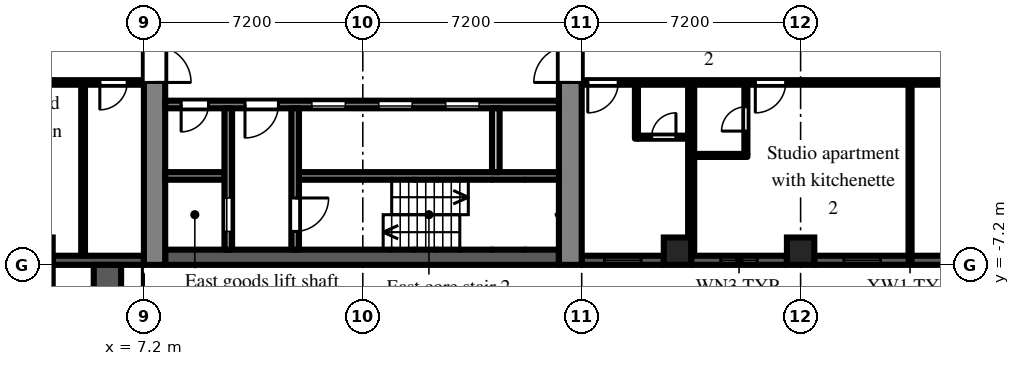
"""IFC4 building model, lengths in metres.
Left out: names, types, materials, properties, quantities, classifications, styles, units other than length and angle.
Written with IfcOpenShell. Run it as: python <this file> out.ifc"""

import sys

from ifc_helpers import new_model, si_unit, direction, frame, frame_2d, origin, origin_2d, place, context, subcontext, project, spatial, rectangle, extrude, element, fill, save


model = new_model("IFC4")
c1 = context("Model", 3, precision=1e-05, world=origin(), true_north=direction((0.0, 1.0)))
c2 = subcontext(c1, "Body", "Model", "MODEL_VIEW")
j1 = project(units=[si_unit("LENGTHUNIT", "METRE"), si_unit("PLANEANGLEUNIT", "RADIAN")], contexts=[c1])
p1 = place(None, origin())
s1 = spatial("IfcSite", under=j1, at=p1, CompositionType="ELEMENT")
p2 = place(p1, origin())
s2 = spatial("IfcBuilding", under=s1, at=p2, CompositionType="ELEMENT")
p3 = place(p2, frame((0.0, 0.0, 66.9)))
s3 = spatial("IfcBuildingStorey", under=s2, at=p3, CompositionType="ELEMENT", Elevation=66.9)
for number, where, z_axis, x_axis in (
    (1, (24.75, -6.75, 0.0), (0.0, 0.0, 1.0), (1.0, 0.0, 0.0)),
    (2, (28.8, -6.75, 0.0), (0.0, 0.0, 1.0), (1.0, 0.0, 0.0)),
):
    element("IfcColumn", number, at=place(p3, frame(where, z_axis=z_axis, x_axis=x_axis)), inside=s3, PredefinedType="COLUMN", context=c2, shape_type="SweptSolid", body=[
        extrude(rectangle(XDim=0.9, YDim=0.9, at=origin_2d()), origin(), (0.0, 0.0, 1.0), 3.0),
    ])
p4 = place(p3, frame((21.6, -7.05, 0.0), z_axis=(0.0, 0.0, 1.0), x_axis=(1.0, 0.0, 0.0)))
e3 = element("IfcWall", 3, at=p4, inside=s3, PredefinedType="SOLIDWALL", context=c2, shape_type="SweptSolid", body=[
    extrude(rectangle(XDim=2.7, YDim=0.3, at=frame_2d((1.35, 0.0))), origin(), (0.0, 0.0, 1.0), 2.1),
])
p5 = place(p4, frame((0.75, 0.0, 0.2)))
e4 = element("IfcOpeningElement", 4, at=p5, cuts=e3, PredefinedType="OPENING", context=c2, shape_type="SweptSolid", body=[
    extrude(rectangle(XDim=1.2, YDim=1.85, at=frame_2d((0.6, 0.925))), frame((0.0, 0.16, 0.0), z_axis=(0.0, -1.0, 0.0), x_axis=(1.0, 0.0, 0.0)), (0.0, 0.0, 1.0), 0.32),
])
p6 = place(p3, frame((25.2, -7.05, 0.0), z_axis=(0.0, 0.0, 1.0), x_axis=(1.0, 0.0, 0.0)))
e5 = element("IfcWall", 5, at=p6, inside=s3, PredefinedType="SOLIDWALL", context=c2, shape_type="SweptSolid", body=[
    extrude(rectangle(XDim=3.15, YDim=0.3, at=frame_2d((1.575, 0.0))), origin(), (0.0, 0.0, 1.0), 2.1),
])
p7 = place(p6, frame((0.975, 0.0, 0.2)))
e6 = element("IfcOpeningElement", 6, at=p7, cuts=e5, PredefinedType="OPENING", context=c2, shape_type="SweptSolid", body=[
    extrude(rectangle(XDim=1.2, YDim=1.85, at=frame_2d((0.6, 0.925))), frame((0.0, 0.16, 0.0), z_axis=(0.0, -1.0, 0.0), x_axis=(1.0, 0.0, 0.0)), (0.0, 0.0, 1.0), 0.32),
])
p8 = place(p3, frame((29.25, -7.05, 0.0), z_axis=(0.0, 0.0, 1.0), x_axis=(1.0, 0.0, 0.0)))
e7 = element("IfcWall", 7, at=p8, inside=s3, PredefinedType="SOLIDWALL", context=c2, shape_type="SweptSolid", body=[
    extrude(rectangle(XDim=6.3, YDim=0.3, at=frame_2d((3.15, 0.0))), origin(), (0.0, 0.0, 1.0), 2.1),
])
p9 = place(p8, frame((0.975, 0.0, 0.2)))
e8 = element("IfcOpeningElement", 8, at=p9, cuts=e7, PredefinedType="OPENING", context=c2, shape_type="SweptSolid", body=[
    extrude(rectangle(XDim=1.2, YDim=1.85, at=frame_2d((0.6, 0.925))), frame((0.0, 0.16, 0.0), z_axis=(0.0, -1.0, 0.0), x_axis=(1.0, 0.0, 0.0)), (0.0, 0.0, 1.0), 0.32),
])
p10 = place(p3, frame((4.05, -14.4, 0.0), z_axis=(0.0, 0.0, 1.0), x_axis=(0.0, 1.0, 0.0)))
e9 = element("IfcWall", 9, at=p10, inside=s3, PredefinedType="SOLIDWALL", context=c2, shape_type="SweptSolid", body=[
    extrude(rectangle(XDim=7.2, YDim=0.3, at=frame_2d((3.6, 0.0))), origin(), (0.0, 0.0, 1.0), 2.1),
])
p11 = place(p10, frame((3.0, 0.0, 0.0)))
e10 = element("IfcOpeningElement", 10, at=p11, cuts=e9, PredefinedType="OPENING", context=c2, shape_type="SweptSolid", body=[
    extrude(rectangle(XDim=1.2, YDim=2.05, at=frame_2d((0.6, 1.025))), frame((0.0, 0.16, 0.0), z_axis=(0.0, -1.0, 0.0), x_axis=(1.0, 0.0, 0.0)), (0.0, 0.0, 1.0), 0.32),
])
p12 = place(p10, frame((0.9, 0.0, 0.2)))
e11 = element("IfcOpeningElement", 11, at=p12, cuts=e9, PredefinedType="OPENING", context=c2, shape_type="SweptSolid", body=[
    extrude(rectangle(XDim=1.8, YDim=1.85, at=frame_2d((0.9, 0.925))), frame((0.0, 0.16, 0.0), z_axis=(0.0, -1.0, 0.0), x_axis=(1.0, 0.0, 0.0)), (0.0, 0.0, 1.0), 0.32),
])
p13 = place(p10, frame((4.5, 0.0, 0.2)))
e12 = element("IfcOpeningElement", 12, at=p13, cuts=e9, PredefinedType="OPENING", context=c2, shape_type="SweptSolid", body=[
    extrude(rectangle(XDim=1.8, YDim=1.85, at=frame_2d((0.9, 0.925))), frame((0.0, 0.16, 0.0), z_axis=(0.0, -1.0, 0.0), x_axis=(1.0, 0.0, 0.0)), (0.0, 0.0, 1.0), 0.32),
])
p14 = place(p3, frame((4.2, -7.05, 0.0), z_axis=(0.0, 0.0, 1.0), x_axis=(1.0, 0.0, 0.0)))
e13 = element("IfcWall", 13, at=p14, inside=s3, PredefinedType="SOLIDWALL", context=c2, shape_type="SweptSolid", body=[
    extrude(rectangle(XDim=3.0, YDim=0.3, at=frame_2d((1.5, 0.0))), origin(), (0.0, 0.0, 1.0), 2.1),
])
p15 = place(p3, frame((6.0, -14.4, 0.0), z_axis=(0.0, 0.0, 1.0), x_axis=(0.0, 1.0, 0.0)))
e14 = element("IfcWall", 14, at=p15, inside=s3, PredefinedType="PARAPET", context=c2, shape_type="SweptSolid", body=[
    extrude(rectangle(XDim=7.2, YDim=0.9, at=frame_2d((3.6, 0.0))), origin(), (0.0, 0.0, 1.0), 0.8),
])
p16 = place(p3, frame((7.55, -7.2, 0.0), z_axis=(0.0, 0.0, 1.0), x_axis=(0.0, 1.0, 0.0)))
e15 = element("IfcWall", 15, at=p16, inside=s3, PredefinedType="SHEAR", context=c2, shape_type="SweptSolid", body=[
    extrude(rectangle(XDim=14.4, YDim=0.7, at=frame_2d((7.2, 0.0))), origin(), (0.0, 0.0, 1.0), 2.575),
])
p17 = place(p16, frame((6.0, 0.0, 0.0)))
e16 = element("IfcOpeningElement", 16, at=p17, cuts=e15, PredefinedType="OPENING", context=c2, shape_type="SweptSolid", body=[
    extrude(rectangle(XDim=2.4, YDim=2.2, at=frame_2d((1.2, 1.1))), frame((0.0, 0.36, 0.0), z_axis=(0.0, -1.0, 0.0), x_axis=(1.0, 0.0, 0.0)), (0.0, 0.0, 1.0), 0.72),
])
p18 = place(p3, frame((21.225, -7.2, 0.0), z_axis=(0.0, 0.0, 1.0), x_axis=(0.0, 1.0, 0.0)))
e17 = element("IfcWall", 17, at=p18, inside=s3, PredefinedType="SHEAR", context=c2, shape_type="SweptSolid", body=[
    extrude(rectangle(XDim=14.4, YDim=0.75, at=frame_2d((7.2, 0.0))), origin(), (0.0, 0.0, 1.0), 2.575),
])
p19 = place(p18, frame((6.0, 0.0, 0.0)))
e18 = element("IfcOpeningElement", 18, at=p19, cuts=e17, PredefinedType="OPENING", context=c2, shape_type="SweptSolid", body=[
    extrude(rectangle(XDim=2.4, YDim=2.2, at=frame_2d((1.2, 1.1))), frame((0.0, 0.385, 0.0), z_axis=(0.0, -1.0, 0.0), x_axis=(1.0, 0.0, 0.0)), (0.0, 0.0, 1.0), 0.77),
])
p20 = place(p3, frame((7.9, -6.95, 0.0), z_axis=(0.0, 0.0, 1.0), x_axis=(1.0, 0.0, 0.0)))
e19 = element("IfcWall", 19, at=p20, inside=s3, PredefinedType="SHEAR", context=c2, shape_type="SweptSolid", body=[
    extrude(rectangle(XDim=12.95, YDim=0.5, at=frame_2d((6.475, 0.0))), origin(), (0.0, 0.0, 1.0), 2.575),
])
p21 = place(p3, frame((7.9, -1.925, 0.0), z_axis=(0.0, 0.0, 1.0), x_axis=(1.0, 0.0, 0.0)))
e20 = element("IfcWall", 20, at=p21, inside=s3, PredefinedType="SHEAR", context=c2, shape_type="SweptSolid", body=[
    extrude(rectangle(XDim=12.95, YDim=0.25, at=frame_2d((6.475, 0.0))), origin(), (0.0, 0.0, 1.0), 2.575),
])
p22 = place(p21, frame((4.825, 0.0, 0.0)))
e21 = element("IfcOpeningElement", 21, at=p22, cuts=e20, PredefinedType="OPENING", context=c2, shape_type="SweptSolid", body=[
    extrude(rectangle(XDim=1.1, YDim=2.1, at=frame_2d((0.55, 1.05))), frame((0.0, 0.135, 0.0), z_axis=(0.0, -1.0, 0.0), x_axis=(1.0, 0.0, 0.0)), (0.0, 0.0, 1.0), 0.27),
])
p23 = place(p21, frame((7.025, 0.0, 0.0)))
e22 = element("IfcOpeningElement", 22, at=p23, cuts=e20, PredefinedType="OPENING", context=c2, shape_type="SweptSolid", body=[
    extrude(rectangle(XDim=1.1, YDim=2.1, at=frame_2d((0.55, 1.05))), frame((0.0, 0.135, 0.0), z_axis=(0.0, -1.0, 0.0), x_axis=(1.0, 0.0, 0.0)), (0.0, 0.0, 1.0), 0.27),
])
p24 = place(p21, frame((9.225, 0.0, 0.0)))
e23 = element("IfcOpeningElement", 23, at=p24, cuts=e20, PredefinedType="OPENING", context=c2, shape_type="SweptSolid", body=[
    extrude(rectangle(XDim=1.1, YDim=2.1, at=frame_2d((0.55, 1.05))), frame((0.0, 0.135, 0.0), z_axis=(0.0, -1.0, 0.0), x_axis=(1.0, 0.0, 0.0)), (0.0, 0.0, 1.0), 0.27),
])
p25 = place(p21, frame((0.525, 0.0, 0.0)))
e24 = element("IfcOpeningElement", 24, at=p25, cuts=e20, PredefinedType="OPENING", context=c2, shape_type="SweptSolid", body=[
    extrude(rectangle(XDim=0.9, YDim=2.1, at=frame_2d((0.45, 1.05))), frame((0.0, 0.135, 0.0), z_axis=(0.0, -1.0, 0.0), x_axis=(1.0, 0.0, 0.0)), (0.0, 0.0, 1.0), 0.27),
])
p26 = place(p21, frame((2.625, 0.0, 0.0)))
e25 = element("IfcOpeningElement", 25, at=p26, cuts=e20, PredefinedType="OPENING", context=c2, shape_type="SweptSolid", body=[
    extrude(rectangle(XDim=1.1, YDim=2.1, at=frame_2d((0.55, 1.05))), frame((0.0, 0.135, 0.0), z_axis=(0.0, -1.0, 0.0), x_axis=(1.0, 0.0, 0.0)), (0.0, 0.0, 1.0), 0.27),
])
p27 = place(p3, frame((7.9, -4.275, 0.0), z_axis=(0.0, 0.0, 1.0), x_axis=(1.0, 0.0, 0.0)))
e26 = element("IfcWall", 26, at=p27, inside=s3, PredefinedType="SHEAR", context=c2, shape_type="SweptSolid", body=[
    extrude(rectangle(XDim=1.95, YDim=0.25, at=frame_2d((0.975, 0.0))), origin(), (0.0, 0.0, 1.0), 2.575),
])
p28 = place(p3, frame((12.3, -4.275, 0.0), z_axis=(0.0, 0.0, 1.0), x_axis=(1.0, 0.0, 0.0)))
e27 = element("IfcWall", 27, at=p28, inside=s3, PredefinedType="SHEAR", context=c2, shape_type="SweptSolid", body=[
    extrude(rectangle(XDim=8.55, YDim=0.25, at=frame_2d((4.275, 0.0))), origin(), (0.0, 0.0, 1.0), 2.575),
])
p29 = place(p3, frame((9.975, -2.05, 0.0), z_axis=(0.0, 0.0, 1.0), x_axis=(0.0, -1.0, 0.0)))
e28 = element("IfcWall", 28, at=p29, inside=s3, PredefinedType="SHEAR", context=c2, shape_type="SweptSolid", body=[
    extrude(rectangle(XDim=4.65, YDim=0.25, at=frame_2d((2.325, 0.0))), origin(), (0.0, 0.0, 1.0), 2.575),
])
p30 = place(p29, frame((2.95, 0.0, 0.0)))
e29 = element("IfcOpeningElement", 29, at=p30, cuts=e28, PredefinedType="OPENING", context=c2, shape_type="SweptSolid", body=[
    extrude(rectangle(XDim=1.1, YDim=2.1, at=frame_2d((0.55, 1.05))), frame((0.0, 0.135, 0.0), z_axis=(0.0, -1.0, 0.0), x_axis=(1.0, 0.0, 0.0)), (0.0, 0.0, 1.0), 0.27),
])
p31 = place(p3, frame((12.175, -2.05, 0.0), z_axis=(0.0, 0.0, 1.0), x_axis=(0.0, -1.0, 0.0)))
e30 = element("IfcWall", 30, at=p31, inside=s3, PredefinedType="SHEAR", context=c2, shape_type="SweptSolid", body=[
    extrude(rectangle(XDim=4.65, YDim=0.25, at=frame_2d((2.325, 0.0))), origin(), (0.0, 0.0, 1.0), 2.575),
])
p32 = place(p31, frame((2.95, 0.0, 0.0)))
e31 = element("IfcOpeningElement", 31, at=p32, cuts=e30, PredefinedType="OPENING", context=c2, shape_type="SweptSolid", body=[
    extrude(rectangle(XDim=1.1, YDim=2.1, at=frame_2d((0.55, 1.05))), frame((0.0, 0.135, 0.0), z_axis=(0.0, -1.0, 0.0), x_axis=(1.0, 0.0, 0.0)), (0.0, 0.0, 1.0), 0.27),
])
p33 = place(p3, frame((18.775, -2.05, 0.0), z_axis=(0.0, 0.0, 1.0), x_axis=(0.0, -1.0, 0.0)))
e32 = element("IfcWall", 32, at=p33, inside=s3, PredefinedType="PARTITIONING", context=c2, shape_type="SweptSolid", body=[
    extrude(rectangle(XDim=2.1, YDim=0.25, at=frame_2d((1.05, 0.0))), origin(), (0.0, 0.0, 1.0), 2.575),
])
p34 = place(p3, frame((1.275, -1.2, 0.0), z_axis=(0.0, 0.0, 1.0), x_axis=(1.0, 0.0, 0.0)))
e33 = element("IfcWall", 33, at=p34, inside=s3, PredefinedType="PARTITIONING", context=c2, shape_type="SweptSolid", body=[
    extrude(rectangle(XDim=5.925, YDim=0.15, at=frame_2d((2.962, 0.0))), origin(), (0.0, 0.0, 1.0), 2.575),
])
p35 = place(p34, frame((4.475, 0.0, 0.0)))
e34 = element("IfcOpeningElement", 34, at=p35, cuts=e33, PredefinedType="OPENING", context=c2, shape_type="SweptSolid", body=[
    extrude(rectangle(XDim=0.9, YDim=2.1, at=frame_2d((0.45, 1.05))), frame((0.0, 0.085, 0.0), z_axis=(0.0, -1.0, 0.0), x_axis=(1.0, 0.0, 0.0)), (0.0, 0.0, 1.0), 0.17),
])
p36 = place(p3, frame((5.2, -6.9, 0.0), z_axis=(0.0, 0.0, 1.0), x_axis=(0.0, 1.0, 0.0)))
e35 = element("IfcWall", 35, at=p36, inside=s3, PredefinedType="PARTITIONING", context=c2, shape_type="SweptSolid", body=[
    extrude(rectangle(XDim=5.625, YDim=0.125, at=frame_2d((2.812, 0.0))), origin(), (0.0, 0.0, 1.0), 2.575),
])
p37 = place(p3, frame((21.6, -1.2, 0.0), z_axis=(0.0, 0.0, 1.0), x_axis=(1.0, 0.0, 0.0)))
e36 = element("IfcWall", 36, at=p37, inside=s3, PredefinedType="PARTITIONING", context=c2, shape_type="SweptSolid", body=[
    extrude(rectangle(XDim=14.9, YDim=0.15, at=frame_2d((7.45, 0.0))), origin(), (0.0, 0.0, 1.0), 2.575),
])
p38 = place(p37, frame((0.2, 0.0, 0.0)))
e37 = element("IfcOpeningElement", 37, at=p38, cuts=e36, PredefinedType="OPENING", context=c2, shape_type="SweptSolid", body=[
    extrude(rectangle(XDim=1.0, YDim=2.1, at=frame_2d((0.5, 1.05))), frame((0.0, 0.085, 0.0), z_axis=(0.0, -1.0, 0.0), x_axis=(1.0, 0.0, 0.0)), (0.0, 0.0, 1.0), 0.17),
])
p39 = place(p37, frame((5.71, 0.0, 0.0)))
e38 = element("IfcOpeningElement", 38, at=p39, cuts=e36, PredefinedType="OPENING", context=c2, shape_type="SweptSolid", body=[
    extrude(rectangle(XDim=1.0, YDim=2.1, at=frame_2d((0.5, 1.05))), frame((0.0, 0.085, 0.0), z_axis=(0.0, -1.0, 0.0), x_axis=(1.0, 0.0, 0.0)), (0.0, 0.0, 1.0), 0.17),
])
p40 = place(p37, frame((11.95, 0.0, 0.0)))
e39 = element("IfcOpeningElement", 39, at=p40, cuts=e36, PredefinedType="OPENING", context=c2, shape_type="SweptSolid", body=[
    extrude(rectangle(XDim=1.8, YDim=2.1, at=frame_2d((0.9, 1.05))), frame((0.0, 0.085, 0.0), z_axis=(0.0, -1.0, 0.0), x_axis=(1.0, 0.0, 0.0)), (0.0, 0.0, 1.0), 0.17),
])
p41 = place(p3, frame((23.4, -3.05, 0.0), z_axis=(0.0, 0.0, 1.0), x_axis=(0.0, 1.0, 0.0)))
e40 = element("IfcWall", 40, at=p41, inside=s3, PredefinedType="PARTITIONING", context=c2, shape_type="SweptSolid", body=[
    extrude(rectangle(XDim=1.775, YDim=0.1, at=frame_2d((0.888, 0.0))), origin(), (0.0, 0.0, 1.0), 2.575),
])
p42 = place(p3, frame((23.45, -3.0, 0.0), z_axis=(0.0, 0.0, 1.0), x_axis=(1.0, 0.0, 0.0)))
e41 = element("IfcWall", 41, at=p42, inside=s3, PredefinedType="PARTITIONING", context=c2, shape_type="SweptSolid", body=[
    extrude(rectangle(XDim=1.65, YDim=0.1, at=frame_2d((0.825, 0.0))), origin(), (0.0, 0.0, 1.0), 2.575),
])
p43 = place(p42, frame((0.45, 0.0, 0.0)))
e42 = element("IfcOpeningElement", 42, at=p43, cuts=e41, PredefinedType="OPENING", context=c2, shape_type="SweptSolid", body=[
    extrude(rectangle(XDim=0.8, YDim=2.1, at=frame_2d((0.4, 1.05))), frame((0.0, 0.06, 0.0), z_axis=(0.0, -1.0, 0.0), x_axis=(1.0, 0.0, 0.0)), (0.0, 0.0, 1.0), 0.12),
])
p44 = place(p3, frame((25.2, -6.9, 0.0), z_axis=(0.0, 0.0, 1.0), x_axis=(0.0, 1.0, 0.0)))
e43 = element("IfcWall", 43, at=p44, inside=s3, PredefinedType="PARTITIONING", context=c2, shape_type="SweptSolid", body=[
    extrude(rectangle(XDim=5.625, YDim=0.2, at=frame_2d((2.812, 0.0))), origin(), (0.0, 0.0, 1.0), 2.575),
])
p45 = place(p3, frame((25.3, -3.6, 0.0), z_axis=(0.0, 0.0, 1.0), x_axis=(1.0, 0.0, 0.0)))
e44 = element("IfcWall", 44, at=p45, inside=s3, PredefinedType="PARTITIONING", context=c2, shape_type="SweptSolid", body=[
    extrude(rectangle(XDim=1.75, YDim=0.1, at=frame_2d((0.875, 0.0))), origin(), (0.0, 0.0, 1.0), 2.575),
])
p46 = place(p3, frame((27.0, -3.55, 0.0), z_axis=(0.0, 0.0, 1.0), x_axis=(0.0, 1.0, 0.0)))
e45 = element("IfcWall", 45, at=p46, inside=s3, PredefinedType="PARTITIONING", context=c2, shape_type="SweptSolid", body=[
    extrude(rectangle(XDim=2.275, YDim=0.1, at=frame_2d((1.138, 0.0))), origin(), (0.0, 0.0, 1.0), 2.575),
])
p47 = place(p46, frame((0.75, 0.0, 0.0)))
e46 = element("IfcOpeningElement", 46, at=p47, cuts=e45, PredefinedType="OPENING", context=c2, shape_type="SweptSolid", body=[
    extrude(rectangle(XDim=0.8, YDim=2.1, at=frame_2d((0.4, 1.05))), frame((0.0, 0.06, 0.0), z_axis=(0.0, -1.0, 0.0), x_axis=(1.0, 0.0, 0.0)), (0.0, 0.0, 1.0), 0.12),
])
p48 = place(p3, frame((32.4, -6.9, 0.0), z_axis=(0.0, 0.0, 1.0), x_axis=(0.0, 1.0, 0.0)))
e47 = element("IfcWall", 47, at=p48, inside=s3, PredefinedType="PARTITIONING", context=c2, shape_type="SweptSolid", body=[
    extrude(rectangle(XDim=5.625, YDim=0.1, at=frame_2d((2.812, 0.0))), origin(), (0.0, 0.0, 1.0), 2.575),
])
p49 = place(p5, origin())
e48 = element("IfcWindow", 48, at=p49, inside=s3, PartitioningType="SINGLE_PANEL", PredefinedType="WINDOW", context=c2, shape_type="SweptSolid", body=[
    extrude(rectangle(XDim=1.2, YDim=1.85, at=frame_2d((0.6, 0.925))), frame((0.0, 0.03, 0.0), z_axis=(0.0, -1.0, 0.0), x_axis=(1.0, 0.0, 0.0)), (0.0, 0.0, 1.0), 0.06),
])
fill(e4, e48)
p50 = place(p7, origin())
e49 = element("IfcWindow", 49, at=p50, inside=s3, PartitioningType="SINGLE_PANEL", PredefinedType="WINDOW", context=c2, shape_type="SweptSolid", body=[
    extrude(rectangle(XDim=1.2, YDim=1.85, at=frame_2d((0.6, 0.925))), frame((0.0, 0.03, 0.0), z_axis=(0.0, -1.0, 0.0), x_axis=(1.0, 0.0, 0.0)), (0.0, 0.0, 1.0), 0.06),
])
fill(e6, e49)
p51 = place(p9, origin())
e50 = element("IfcWindow", 50, at=p51, inside=s3, PartitioningType="SINGLE_PANEL", PredefinedType="WINDOW", context=c2, shape_type="SweptSolid", body=[
    extrude(rectangle(XDim=1.2, YDim=1.85, at=frame_2d((0.6, 0.925))), frame((0.0, 0.03, 0.0), z_axis=(0.0, -1.0, 0.0), x_axis=(1.0, 0.0, 0.0)), (0.0, 0.0, 1.0), 0.06),
])
fill(e8, e50)
p52 = place(p22, origin())
e51 = element("IfcDoor", 51, at=p52, inside=s3, OperationType="SLIDING_TO_LEFT", PredefinedType="DOOR", context=c2, shape_type="SweptSolid", body=[
    extrude(rectangle(XDim=1.1, YDim=2.1, at=frame_2d((0.55, 1.05))), frame((0.0, 0.025, 0.0), z_axis=(0.0, -1.0, 0.0), x_axis=(1.0, 0.0, 0.0)), (0.0, 0.0, 1.0), 0.05),
])
fill(e21, e51)
p53 = place(p23, origin())
e52 = element("IfcDoor", 52, at=p53, inside=s3, OperationType="SLIDING_TO_LEFT", PredefinedType="DOOR", context=c2, shape_type="SweptSolid", body=[
    extrude(rectangle(XDim=1.1, YDim=2.1, at=frame_2d((0.55, 1.05))), frame((0.0, 0.025, 0.0), z_axis=(0.0, -1.0, 0.0), x_axis=(1.0, 0.0, 0.0)), (0.0, 0.0, 1.0), 0.05),
])
fill(e22, e52)
p54 = place(p24, origin())
e53 = element("IfcDoor", 53, at=p54, inside=s3, OperationType="SLIDING_TO_LEFT", PredefinedType="DOOR", context=c2, shape_type="SweptSolid", body=[
    extrude(rectangle(XDim=1.1, YDim=2.1, at=frame_2d((0.55, 1.05))), frame((0.0, 0.025, 0.0), z_axis=(0.0, -1.0, 0.0), x_axis=(1.0, 0.0, 0.0)), (0.0, 0.0, 1.0), 0.05),
])
fill(e23, e53)
p55 = place(p30, origin())
e54 = element("IfcDoor", 54, at=p55, inside=s3, OperationType="SLIDING_TO_LEFT", PredefinedType="DOOR", context=c2, shape_type="SweptSolid", body=[
    extrude(rectangle(XDim=1.1, YDim=2.1, at=frame_2d((0.55, 1.05))), frame((0.0, 0.025, 0.0), z_axis=(0.0, -1.0, 0.0), x_axis=(1.0, 0.0, 0.0)), (0.0, 0.0, 1.0), 0.05),
])
fill(e29, e54)
p56 = place(p32, origin())
e55 = element("IfcDoor", 55, at=p56, inside=s3, OperationType="SINGLE_SWING_LEFT", PredefinedType="DOOR", context=c2, shape_type="SweptSolid", body=[
    extrude(rectangle(XDim=1.1, YDim=2.1, at=frame_2d((0.55, 1.05))), frame((0.0, 0.025, 0.0), z_axis=(0.0, -1.0, 0.0), x_axis=(1.0, 0.0, 0.0)), (0.0, 0.0, 1.0), 0.05),
])
fill(e31, e55)
p57 = place(p25, frame((0.9, 0.0, 0.0), z_axis=(0.0, 0.0, 1.0), x_axis=(-1.0, 0.0, 0.0)))
e56 = element("IfcDoor", 56, at=p57, inside=s3, OperationType="SINGLE_SWING_RIGHT", PredefinedType="DOOR", context=c2, shape_type="SweptSolid", body=[
    extrude(rectangle(XDim=0.9, YDim=2.1, at=frame_2d((0.45, 1.05))), frame((0.0, 0.025, 0.0), z_axis=(0.0, -1.0, 0.0), x_axis=(1.0, 0.0, 0.0)), (0.0, 0.0, 1.0), 0.05),
])
fill(e24, e56)
p58 = place(p26, frame((1.1, 0.0, 0.0), z_axis=(0.0, 0.0, 1.0), x_axis=(-1.0, 0.0, 0.0)))
e57 = element("IfcDoor", 57, at=p58, inside=s3, OperationType="SINGLE_SWING_RIGHT", PredefinedType="DOOR", context=c2, shape_type="SweptSolid", body=[
    extrude(rectangle(XDim=1.1, YDim=2.1, at=frame_2d((0.55, 1.05))), frame((0.0, 0.025, 0.0), z_axis=(0.0, -1.0, 0.0), x_axis=(1.0, 0.0, 0.0)), (0.0, 0.0, 1.0), 0.05),
])
fill(e25, e57)
p59 = place(p17, frame((2.4, 0.0, 0.0), z_axis=(0.0, 0.0, 1.0), x_axis=(-1.0, 0.0, 0.0)))
e58 = element("IfcDoor", 58, at=p59, inside=s3, OperationType="DOUBLE_DOOR_DOUBLE_SWING", PredefinedType="DOOR", context=c2, shape_type="SweptSolid", body=[
    extrude(rectangle(XDim=2.4, YDim=2.2, at=frame_2d((1.2, 1.1))), frame((0.0, 0.025, 0.0), z_axis=(0.0, -1.0, 0.0), x_axis=(1.0, 0.0, 0.0)), (0.0, 0.0, 1.0), 0.05),
])
fill(e16, e58)
p60 = place(p19, origin())
e59 = element("IfcDoor", 59, at=p60, inside=s3, OperationType="DOUBLE_DOOR_DOUBLE_SWING", PredefinedType="DOOR", context=c2, shape_type="SweptSolid", body=[
    extrude(rectangle(XDim=2.4, YDim=2.2, at=frame_2d((1.2, 1.1))), frame((0.0, 0.025, 0.0), z_axis=(0.0, -1.0, 0.0), x_axis=(1.0, 0.0, 0.0)), (0.0, 0.0, 1.0), 0.05),
])
fill(e18, e59)
p61 = place(p35, frame((0.9, 0.0, 0.0), z_axis=(0.0, 0.0, 1.0), x_axis=(-1.0, 0.0, 0.0)))
e60 = element("IfcDoor", 60, at=p61, inside=s3, OperationType="SINGLE_SWING_RIGHT", PredefinedType="DOOR", context=c2, shape_type="SweptSolid", body=[
    extrude(rectangle(XDim=0.9, YDim=2.1, at=frame_2d((0.45, 1.05))), frame((0.0, 0.025, 0.0), z_axis=(0.0, -1.0, 0.0), x_axis=(1.0, 0.0, 0.0)), (0.0, 0.0, 1.0), 0.05),
])
fill(e34, e60)
p62 = place(p43, origin())
e61 = element("IfcDoor", 61, at=p62, inside=s3, OperationType="SINGLE_SWING_RIGHT", PredefinedType="DOOR", context=c2, shape_type="SweptSolid", body=[
    extrude(rectangle(XDim=0.8, YDim=2.1, at=frame_2d((0.4, 1.05))), frame((0.0, 0.025, 0.0), z_axis=(0.0, -1.0, 0.0), x_axis=(1.0, 0.0, 0.0)), (0.0, 0.0, 1.0), 0.05),
])
fill(e42, e61)
p63 = place(p38, frame((1.0, 0.0, 0.0), z_axis=(0.0, 0.0, 1.0), x_axis=(-1.0, 0.0, 0.0)))
e62 = element("IfcDoor", 62, at=p63, inside=s3, OperationType="SINGLE_SWING_RIGHT", PredefinedType="DOOR", context=c2, shape_type="SweptSolid", body=[
    extrude(rectangle(XDim=1.0, YDim=2.1, at=frame_2d((0.5, 1.05))), frame((0.0, 0.025, 0.0), z_axis=(0.0, -1.0, 0.0), x_axis=(1.0, 0.0, 0.0)), (0.0, 0.0, 1.0), 0.05),
])
fill(e37, e62)
p64 = place(p47, origin())
e63 = element("IfcDoor", 63, at=p64, inside=s3, OperationType="SINGLE_SWING_LEFT", PredefinedType="DOOR", context=c2, shape_type="SweptSolid", body=[
    extrude(rectangle(XDim=0.8, YDim=2.1, at=frame_2d((0.4, 1.05))), frame((0.0, 0.025, 0.0), z_axis=(0.0, -1.0, 0.0), x_axis=(1.0, 0.0, 0.0)), (0.0, 0.0, 1.0), 0.05),
])
fill(e46, e63)
p65 = place(p39, frame((1.0, 0.0, 0.0), z_axis=(0.0, 0.0, 1.0), x_axis=(-1.0, 0.0, 0.0)))
e64 = element("IfcDoor", 64, at=p65, inside=s3, OperationType="SINGLE_SWING_RIGHT", PredefinedType="DOOR", context=c2, shape_type="SweptSolid", body=[
    extrude(rectangle(XDim=1.0, YDim=2.1, at=frame_2d((0.5, 1.05))), frame((0.0, 0.025, 0.0), z_axis=(0.0, -1.0, 0.0), x_axis=(1.0, 0.0, 0.0)), (0.0, 0.0, 1.0), 0.05),
])
fill(e38, e64)
save(model, sys.argv[1])
